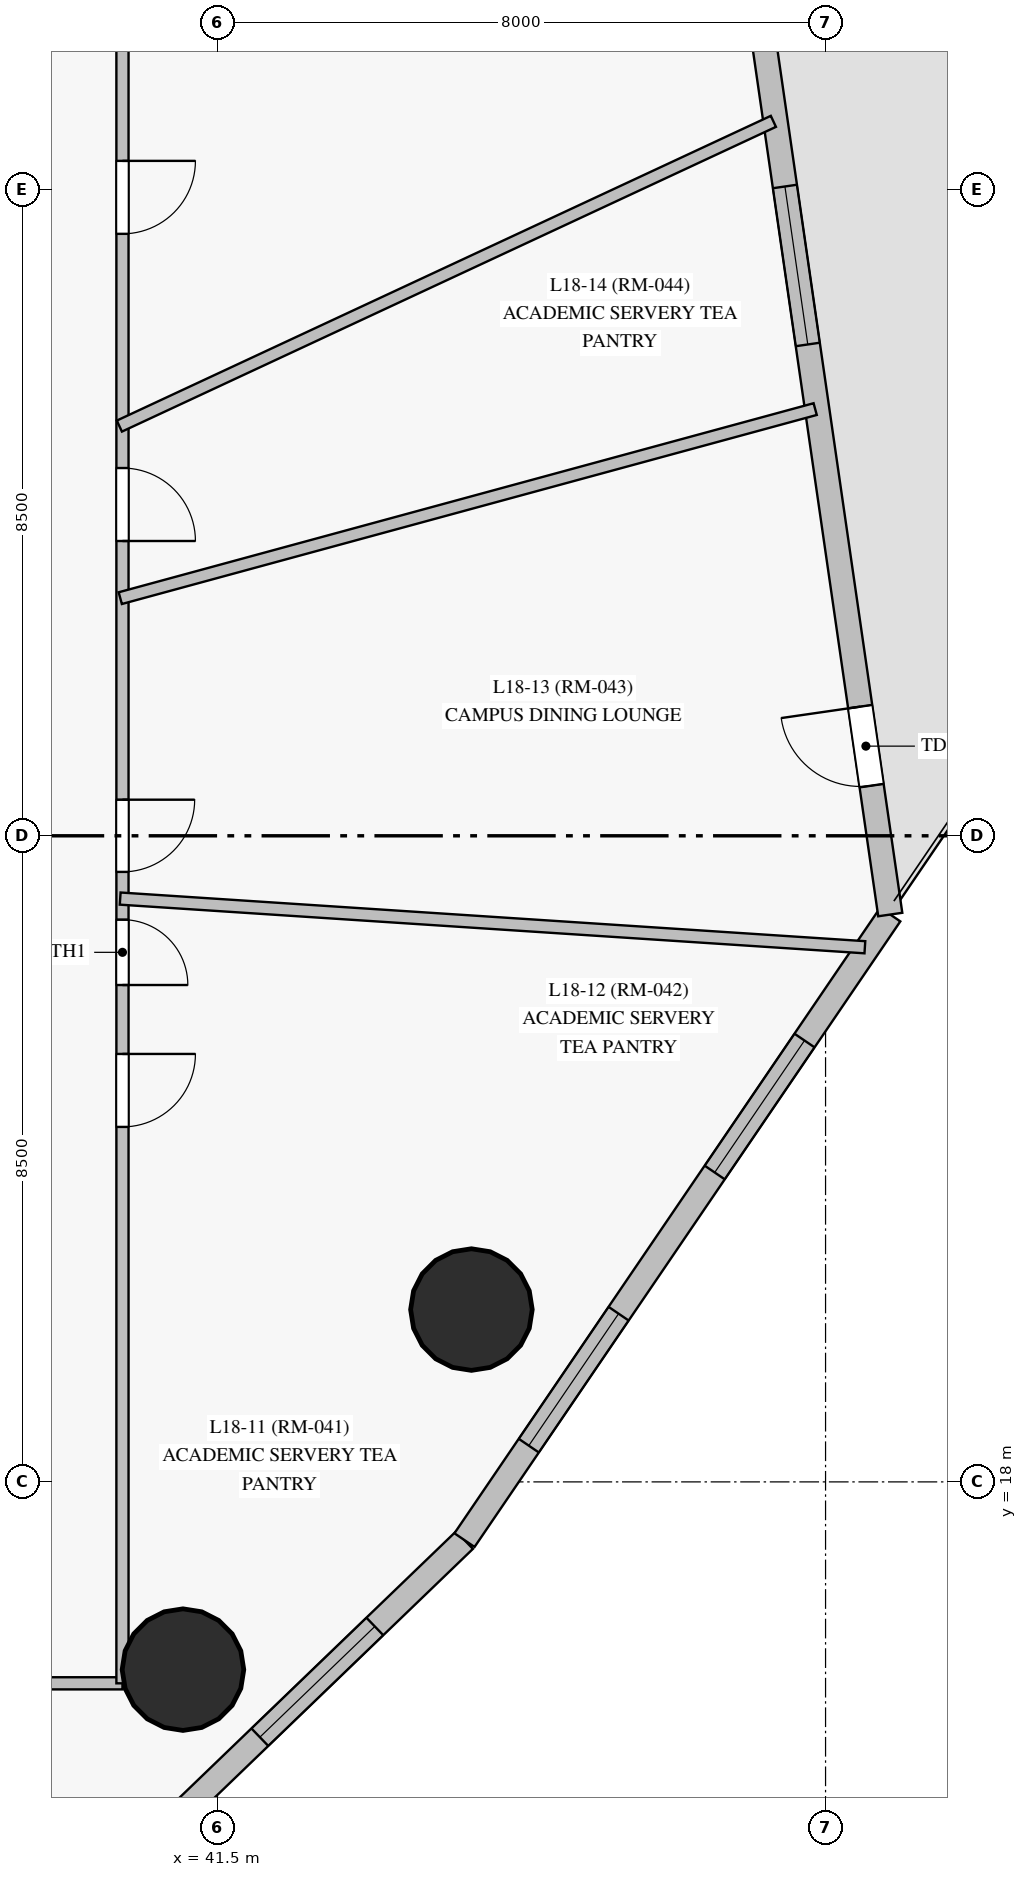
"""IFC4 building model, lengths in metres.
Left out: names, types, materials, properties, quantities, classifications, styles, units other than length and angle.
Written with IfcOpenShell. Run it as: python <this file> out.ifc"""

import sys

from ifc_helpers import new_model, si_unit, direction, frame, frame_2d, origin, origin_with_axes, origin_2d, place, context, subcontext, project, spatial, rectangle, circle, extrude, source, transform, mapped, element, fill, save


model = new_model("IFC4")
c1 = context("Model", 3, precision=1e-05, world=origin(), true_north=direction((0.0, 1.0)))
c2 = subcontext(c1, "Body", "Model", "MODEL_VIEW")
j1 = project(units=[si_unit("LENGTHUNIT", "METRE"), si_unit("PLANEANGLEUNIT", "RADIAN")], contexts=[c1])
p1 = place(None, origin())
s1 = spatial("IfcSite", under=j1, at=p1, CompositionType="ELEMENT")
p2 = place(p1, origin())
s2 = spatial("IfcBuilding", under=s1, at=p2, CompositionType="ELEMENT")
p3 = place(p2, frame((0.0, 0.0, 69.7)))
s3 = spatial("IfcBuildingStorey", under=s2, at=p3, CompositionType="ELEMENT", Elevation=69.7)
m1 = source(origin_with_axes(), c2, "Body", "SweptSolid", [
    extrude(circle(Radius=0.8, at=origin_2d()), origin(), (0.0, 0.0, 1.0), 3.6),
])
for number, where, z_axis, x_axis in (
    (1, (44.841, 20.267, 0.0), (0.0, 0.0, 1.0), (1.0, 0.0, 0.0)),
    (2, (41.046, 15.53, 0.0), (0.0, 0.0, 1.0), (1.0, 0.0, 0.0)),
):
    element("IfcColumn", number, at=place(p3, frame(where, z_axis=z_axis, x_axis=x_axis)), inside=s3, PredefinedType="COLUMN", context=c2, shape_type="MappedRepresentation", body=[
        mapped(m1, transform((0.0, 0.0, 0.0), scale=1.0)),
    ])
p4 = place(p3, frame((37.147, 9.913, 0.0), z_axis=(0.0, 0.0, 1.0), x_axis=(0.720315933047, 0.693646132116, 0.0)))
e3 = element("IfcWall", 3, at=p4, inside=s3, PredefinedType="SOLIDWALL", context=c2, shape_type="SweptSolid", body=[
    extrude(rectangle(XDim=10.555, YDim=0.32, at=frame_2d((5.277, 0.0))), origin(), (0.0, 0.0, 1.0), 3.35),
])
p5 = place(p4, frame((2.202, 0.0, 0.85)))
e4 = element("IfcOpeningElement", 4, at=p5, cuts=e3, PredefinedType="OPENING", context=c2, shape_type="SweptSolid", body=[
    extrude(rectangle(XDim=2.1, YDim=1.95, at=frame_2d((1.05, 0.975))), frame((0.0, 0.17, 0.0), z_axis=(0.0, -1.0, 0.0), x_axis=(1.0, 0.0, 0.0)), (0.0, 0.0, 1.0), 0.34),
])
p6 = place(p4, frame((6.817, 0.0, 0.85)))
e5 = element("IfcOpeningElement", 5, at=p6, cuts=e3, PredefinedType="OPENING", context=c2, shape_type="SweptSolid", body=[
    extrude(rectangle(XDim=2.1, YDim=1.95, at=frame_2d((1.05, 0.975))), frame((0.0, 0.17, 0.0), z_axis=(0.0, -1.0, 0.0), x_axis=(1.0, 0.0, 0.0)), (0.0, 0.0, 1.0), 0.34),
])
p7 = place(p3, frame((44.75, 17.234, 0.0), z_axis=(0.0, 0.0, 1.0), x_axis=(0.562654071803, 0.826692443103, 0.0)))
e6 = element("IfcWall", 6, at=p7, inside=s3, PredefinedType="SOLIDWALL", context=c2, shape_type="SweptSolid", body=[
    extrude(rectangle(XDim=9.956, YDim=0.32, at=frame_2d((4.978, 0.0))), origin(), (0.0, 0.0, 1.0), 3.35),
])
p8 = place(p7, frame((1.503, 0.0, 0.85)))
e7 = element("IfcOpeningElement", 7, at=p8, cuts=e6, PredefinedType="OPENING", context=c2, shape_type="SweptSolid", body=[
    extrude(rectangle(XDim=2.1, YDim=1.95, at=frame_2d((1.05, 0.975))), frame((0.0, 0.17, 0.0), z_axis=(0.0, -1.0, 0.0), x_axis=(1.0, 0.0, 0.0)), (0.0, 0.0, 1.0), 0.34),
])
p9 = place(p7, frame((5.851, 0.0, 0.85)))
e8 = element("IfcOpeningElement", 8, at=p9, cuts=e6, PredefinedType="OPENING", context=c2, shape_type="SweptSolid", body=[
    extrude(rectangle(XDim=2.1, YDim=1.95, at=frame_2d((1.05, 0.975))), frame((0.0, 0.17, 0.0), z_axis=(0.0, -1.0, 0.0), x_axis=(1.0, 0.0, 0.0)), (0.0, 0.0, 1.0), 0.34),
])
p10 = place(p3, frame((50.351, 25.464, 0.0), z_axis=(0.0, 0.0, 1.0), x_axis=(-0.14319608419, 0.989694337396, 0.0)))
e9 = element("IfcWall", 9, at=p10, inside=s3, PredefinedType="SOLIDWALL", context=c2, shape_type="SweptSolid", body=[
    extrude(rectangle(XDim=17.909, YDim=0.32, at=frame_2d((8.954, 0.0))), origin(), (0.0, 0.0, 1.0), 3.35),
])
p11 = place(p10, frame((7.578, 0.0, 0.85)))
e10 = element("IfcOpeningElement", 10, at=p11, cuts=e9, PredefinedType="OPENING", context=c2, shape_type="SweptSolid", body=[
    extrude(rectangle(XDim=2.1, YDim=1.95, at=frame_2d((1.05, 0.975))), frame((0.0, 0.17, 0.0), z_axis=(0.0, -1.0, 0.0), x_axis=(1.0, 0.0, 0.0)), (0.0, 0.0, 1.0), 0.34),
])
p12 = place(p10, frame((11.909, 0.0, 0.85)))
e11 = element("IfcOpeningElement", 11, at=p12, cuts=e9, PredefinedType="OPENING", context=c2, shape_type="SweptSolid", body=[
    extrude(rectangle(XDim=2.1, YDim=1.95, at=frame_2d((1.05, 0.975))), frame((0.0, 0.17, 0.0), z_axis=(0.0, -1.0, 0.0), x_axis=(1.0, 0.0, 0.0)), (0.0, 0.0, 1.0), 0.34),
])
p13 = place(p10, frame((1.714, 0.0, 0.0)))
e12 = element("IfcOpeningElement", 12, at=p13, cuts=e9, PredefinedType="OPENING", context=c2, shape_type="SweptSolid", body=[
    extrude(rectangle(XDim=1.05, YDim=2.12, at=frame_2d((0.525, 1.06))), frame((0.0, 0.17, 0.0), z_axis=(0.0, -1.0, 0.0), x_axis=(1.0, 0.0, 0.0)), (0.0, 0.0, 1.0), 0.34),
])
p14 = place(p3, frame((40.25, 15.35, 0.0), z_axis=(0.0, 0.0, 1.0), x_axis=(-1.0, 0.0, 0.0)))
e13 = element("IfcWall", 13, at=p14, inside=s3, PredefinedType="PARTITIONING", context=c2, shape_type="SweptSolid", body=[
    extrude(rectangle(XDim=29.75, YDim=0.16, at=frame_2d((14.875, 0.0))), origin(), (0.0, 0.0, 1.0), 2.7),
])
p15 = place(p14, frame((26.11, 0.0, 0.0)))
e14 = element("IfcOpeningElement", 14, at=p15, cuts=e13, PredefinedType="OPENING", context=c2, shape_type="SweptSolid", body=[
    extrude(rectangle(XDim=0.96, YDim=2.15, at=frame_2d((0.48, 1.075))), frame((0.0, 0.09, 0.0), z_axis=(0.0, -1.0, 0.0), x_axis=(1.0, 0.0, 0.0)), (0.0, 0.0, 1.0), 0.18),
])
p16 = place(p14, frame((21.837, 0.0, 0.0)))
e15 = element("IfcOpeningElement", 15, at=p16, cuts=e13, PredefinedType="OPENING", context=c2, shape_type="SweptSolid", body=[
    extrude(rectangle(XDim=0.95, YDim=2.15, at=frame_2d((0.475, 1.075))), frame((0.0, 0.09, 0.0), z_axis=(0.0, -1.0, 0.0), x_axis=(1.0, 0.0, 0.0)), (0.0, 0.0, 1.0), 0.18),
])
p17 = place(p14, frame((17.737, 0.0, 0.0)))
e16 = element("IfcOpeningElement", 16, at=p17, cuts=e13, PredefinedType="OPENING", context=c2, shape_type="SweptSolid", body=[
    extrude(rectangle(XDim=0.95, YDim=2.15, at=frame_2d((0.475, 1.075))), frame((0.0, 0.09, 0.0), z_axis=(0.0, -1.0, 0.0), x_axis=(1.0, 0.0, 0.0)), (0.0, 0.0, 1.0), 0.18),
])
p18 = place(p14, frame((15.604, 0.0, 0.0)))
e17 = element("IfcOpeningElement", 17, at=p18, cuts=e13, PredefinedType="OPENING", context=c2, shape_type="SweptSolid", body=[
    extrude(rectangle(XDim=0.95, YDim=2.15, at=frame_2d((0.475, 1.075))), frame((0.0, 0.09, 0.0), z_axis=(0.0, -1.0, 0.0), x_axis=(1.0, 0.0, 0.0)), (0.0, 0.0, 1.0), 0.18),
])
p19 = place(p14, frame((12.96, 0.0, 0.0)))
e18 = element("IfcOpeningElement", 18, at=p19, cuts=e13, PredefinedType="OPENING", context=c2, shape_type="SweptSolid", body=[
    extrude(rectangle(XDim=0.96, YDim=2.15, at=frame_2d((0.48, 1.075))), frame((0.0, 0.09, 0.0), z_axis=(0.0, -1.0, 0.0), x_axis=(1.0, 0.0, 0.0)), (0.0, 0.0, 1.0), 0.18),
])
p20 = place(p14, frame((11.281, 0.0, 0.0)))
e19 = element("IfcOpeningElement", 19, at=p20, cuts=e13, PredefinedType="OPENING", context=c2, shape_type="SweptSolid", body=[
    extrude(rectangle(XDim=0.95, YDim=2.15, at=frame_2d((0.475, 1.075))), frame((0.0, 0.09, 0.0), z_axis=(0.0, -1.0, 0.0), x_axis=(1.0, 0.0, 0.0)), (0.0, 0.0, 1.0), 0.18),
])
p21 = place(p14, frame((9.601, 0.0, 0.0)))
e20 = element("IfcOpeningElement", 20, at=p21, cuts=e13, PredefinedType="OPENING", context=c2, shape_type="SweptSolid", body=[
    extrude(rectangle(XDim=0.96, YDim=2.15, at=frame_2d((0.48, 1.075))), frame((0.0, 0.09, 0.0), z_axis=(0.0, -1.0, 0.0), x_axis=(1.0, 0.0, 0.0)), (0.0, 0.0, 1.0), 0.18),
])
p22 = place(p14, frame((8.498, 0.0, 0.0)))
e21 = element("IfcOpeningElement", 21, at=p22, cuts=e13, PredefinedType="OPENING", context=c2, shape_type="SweptSolid", body=[
    extrude(rectangle(XDim=0.95, YDim=2.15, at=frame_2d((0.475, 1.075))), frame((0.0, 0.09, 0.0), z_axis=(0.0, -1.0, 0.0), x_axis=(1.0, 0.0, 0.0)), (0.0, 0.0, 1.0), 0.18),
])
p23 = place(p14, frame((2.579, 0.0, 0.0)))
e22 = element("IfcOpeningElement", 22, at=p23, cuts=e13, PredefinedType="OPENING", context=c2, shape_type="SweptSolid", body=[
    extrude(rectangle(XDim=0.95, YDim=2.15, at=frame_2d((0.475, 1.075))), frame((0.0, 0.09, 0.0), z_axis=(0.0, -1.0, 0.0), x_axis=(1.0, 0.0, 0.0)), (0.0, 0.0, 1.0), 0.18),
])
p24 = place(p3, frame((40.25, 37.65, 0.0), z_axis=(0.0, 0.0, 1.0), x_axis=(0.0, -1.0, 0.0)))
e23 = element("IfcWall", 23, at=p24, inside=s3, PredefinedType="PARTITIONING", context=c2, shape_type="SweptSolid", body=[
    extrude(rectangle(XDim=22.3, YDim=0.16, at=frame_2d((11.15, 0.0))), origin(), (0.0, 0.0, 1.0), 2.75),
])
p25 = place(p24, frame((14.02, 0.0, 0.0)))
e24 = element("IfcOpeningElement", 24, at=p25, cuts=e23, PredefinedType="OPENING", context=c2, shape_type="SweptSolid", body=[
    extrude(rectangle(XDim=0.96, YDim=2.15, at=frame_2d((0.48, 1.075))), frame((0.0, 0.09, 0.0), z_axis=(0.0, -1.0, 0.0), x_axis=(1.0, 0.0, 0.0)), (0.0, 0.0, 1.0), 0.18),
])
p26 = place(p24, frame((12.253, 0.0, 0.0)))
e25 = element("IfcOpeningElement", 25, at=p26, cuts=e23, PredefinedType="OPENING", context=c2, shape_type="SweptSolid", body=[
    extrude(rectangle(XDim=0.86, YDim=2.1, at=frame_2d((0.43, 1.05))), frame((0.0, 0.09, 0.0), z_axis=(0.0, -1.0, 0.0), x_axis=(1.0, 0.0, 0.0)), (0.0, 0.0, 1.0), 0.18),
])
p27 = place(p24, frame((10.675, 0.0, 0.0)))
e26 = element("IfcOpeningElement", 26, at=p27, cuts=e23, PredefinedType="OPENING", context=c2, shape_type="SweptSolid", body=[
    extrude(rectangle(XDim=0.95, YDim=2.15, at=frame_2d((0.475, 1.075))), frame((0.0, 0.09, 0.0), z_axis=(0.0, -1.0, 0.0), x_axis=(1.0, 0.0, 0.0)), (0.0, 0.0, 1.0), 0.18),
])
p28 = place(p24, frame((6.312, 0.0, 0.0)))
e27 = element("IfcOpeningElement", 27, at=p28, cuts=e23, PredefinedType="OPENING", context=c2, shape_type="SweptSolid", body=[
    extrude(rectangle(XDim=0.96, YDim=2.15, at=frame_2d((0.48, 1.075))), frame((0.0, 0.09, 0.0), z_axis=(0.0, -1.0, 0.0), x_axis=(1.0, 0.0, 0.0)), (0.0, 0.0, 1.0), 0.18),
])
p29 = place(p24, frame((2.271, 0.0, 0.0)))
e28 = element("IfcOpeningElement", 28, at=p29, cuts=e23, PredefinedType="OPENING", context=c2, shape_type="SweptSolid", body=[
    extrude(rectangle(XDim=0.96, YDim=2.15, at=frame_2d((0.48, 1.075))), frame((0.0, 0.09, 0.0), z_axis=(0.0, -1.0, 0.0), x_axis=(1.0, 0.0, 0.0)), (0.0, 0.0, 1.0), 0.18),
])
p30 = place(p3, frame((40.22, 25.674, 0.0), z_axis=(0.0, 0.0, 1.0), x_axis=(0.997870581646, -0.065225012725, 0.0)))
e29 = element("IfcWall", 29, at=p30, inside=s3, PredefinedType="PARTITIONING", context=c2, shape_type="SweptSolid", body=[
    extrude(rectangle(XDim=9.818, YDim=0.16, at=frame_2d((4.909, 0.0))), origin(), (0.0, 0.0, 1.0), 3.35),
])
p31 = place(p3, frame((40.209, 31.89, 0.0), z_axis=(0.0, 0.0, 1.0), x_axis=(0.906426759987, 0.422363029609, 0.0)))
e30 = element("IfcWall", 30, at=p31, inside=s3, PredefinedType="PARTITIONING", context=c2, shape_type="SweptSolid", body=[
    extrude(rectangle(XDim=9.492, YDim=0.16, at=frame_2d((4.746, 0.0))), origin(), (0.0, 0.0, 1.0), 3.35),
])
p32 = place(p3, frame((40.221, 29.626, 0.0), z_axis=(0.0, 0.0, 1.0), x_axis=(0.96493250171, 0.262498127885, 0.0)))
e31 = element("IfcWall", 31, at=p32, inside=s3, PredefinedType="PARTITIONING", context=c2, shape_type="SweptSolid", body=[
    extrude(rectangle(XDim=9.475, YDim=0.16, at=frame_2d((4.737, 0.0))), origin(), (0.0, 0.0, 1.0), 3.35),
])
m2 = source(origin_with_axes(), c2, "Body", "SweptSolid", [
    extrude(rectangle(XDim=2.1, YDim=1.95, at=frame_2d((1.05, 0.975))), frame((0.0, 0.03, 0.0), z_axis=(0.0, -1.0, 0.0), x_axis=(1.0, 0.0, 0.0)), (0.0, 0.0, 1.0), 0.06),
])
p33 = place(p6, origin())
e32 = element("IfcWindow", 32, at=p33, inside=s3, PartitioningType="SINGLE_PANEL", PredefinedType="WINDOW", context=c2, shape_type="MappedRepresentation", body=[
    mapped(m2, transform((0.0, 0.0, 0.0), scale=1.0)),
])
fill(e5, e32)
p34 = place(p8, origin())
e33 = element("IfcWindow", 33, at=p34, inside=s3, PartitioningType="SINGLE_PANEL", PredefinedType="WINDOW", context=c2, shape_type="MappedRepresentation", body=[
    mapped(m2, transform((0.0, 0.0, 0.0), scale=1.0)),
])
fill(e7, e33)
p35 = place(p9, origin())
e34 = element("IfcWindow", 34, at=p35, inside=s3, PartitioningType="SINGLE_PANEL", PredefinedType="WINDOW", context=c2, shape_type="MappedRepresentation", body=[
    mapped(m2, transform((0.0, 0.0, 0.0), scale=1.0)),
])
fill(e8, e34)
p36 = place(p11, origin())
e35 = element("IfcWindow", 35, at=p36, inside=s3, PartitioningType="SINGLE_PANEL", PredefinedType="WINDOW", context=c2, shape_type="MappedRepresentation", body=[
    mapped(m2, transform((0.0, 0.0, 0.0), scale=1.0)),
])
fill(e10, e35)
m3 = source(origin_with_axes(), c2, "Body", "SweptSolid", [
    extrude(rectangle(XDim=1.05, YDim=2.12, at=frame_2d((0.525, 1.06))), frame((0.0, 0.025, 0.0), z_axis=(0.0, -1.0, 0.0), x_axis=(1.0, 0.0, 0.0)), (0.0, 0.0, 1.0), 0.05),
])
p37 = place(p13, origin())
e36 = element("IfcDoor", 36, at=p37, inside=s3, OperationType="SINGLE_SWING_RIGHT", PredefinedType="DOOR", context=c2, shape_type="MappedRepresentation", body=[
    mapped(m3, transform((0.0, 0.0, 0.0), scale=1.0)),
])
fill(e12, e36)
m4 = source(origin_with_axes(), c2, "Body", "SweptSolid", [
    extrude(rectangle(XDim=0.96, YDim=2.15, at=frame_2d((0.48, 1.075))), frame((0.0, 0.025, 0.0), z_axis=(0.0, -1.0, 0.0), x_axis=(1.0, 0.0, 0.0)), (0.0, 0.0, 1.0), 0.05),
])
p38 = place(p25, origin())
e37 = element("IfcDoor", 37, at=p38, inside=s3, OperationType="SINGLE_SWING_LEFT", PredefinedType="DOOR", context=c2, shape_type="MappedRepresentation", body=[
    mapped(m4, transform((0.0, 0.0, 0.0), scale=1.0)),
])
fill(e24, e37)
m5 = source(origin_with_axes(), c2, "Body", "SweptSolid", [
    extrude(rectangle(XDim=0.86, YDim=2.1, at=frame_2d((0.43, 1.05))), frame((0.0, 0.025, 0.0), z_axis=(0.0, -1.0, 0.0), x_axis=(1.0, 0.0, 0.0)), (0.0, 0.0, 1.0), 0.05),
])
p39 = place(p26, origin())
e38 = element("IfcDoor", 38, at=p39, inside=s3, OperationType="SINGLE_SWING_RIGHT", PredefinedType="DOOR", context=c2, shape_type="MappedRepresentation", body=[
    mapped(m5, transform((0.0, 0.0, 0.0), scale=1.0)),
])
fill(e25, e38)
m6 = source(origin_with_axes(), c2, "Body", "SweptSolid", [
    extrude(rectangle(XDim=0.95, YDim=2.15, at=frame_2d((0.475, 1.075))), frame((0.0, 0.025, 0.0), z_axis=(0.0, -1.0, 0.0), x_axis=(1.0, 0.0, 0.0)), (0.0, 0.0, 1.0), 0.05),
])
p40 = place(p27, origin())
e39 = element("IfcDoor", 39, at=p40, inside=s3, OperationType="SINGLE_SWING_LEFT", PredefinedType="DOOR", context=c2, shape_type="MappedRepresentation", body=[
    mapped(m6, transform((0.0, 0.0, 0.0), scale=1.0)),
])
fill(e26, e39)
p41 = place(p28, origin())
e40 = element("IfcDoor", 40, at=p41, inside=s3, OperationType="SINGLE_SWING_RIGHT", PredefinedType="DOOR", context=c2, shape_type="MappedRepresentation", body=[
    mapped(m4, transform((0.0, 0.0, 0.0), scale=1.0)),
])
fill(e27, e40)
p42 = place(p29, origin())
e41 = element("IfcDoor", 41, at=p42, inside=s3, OperationType="SINGLE_SWING_LEFT", PredefinedType="DOOR", context=c2, shape_type="MappedRepresentation", body=[
    mapped(m4, transform((0.0, 0.0, 0.0), scale=1.0)),
])
fill(e28, e41)
save(model, sys.argv[1])
